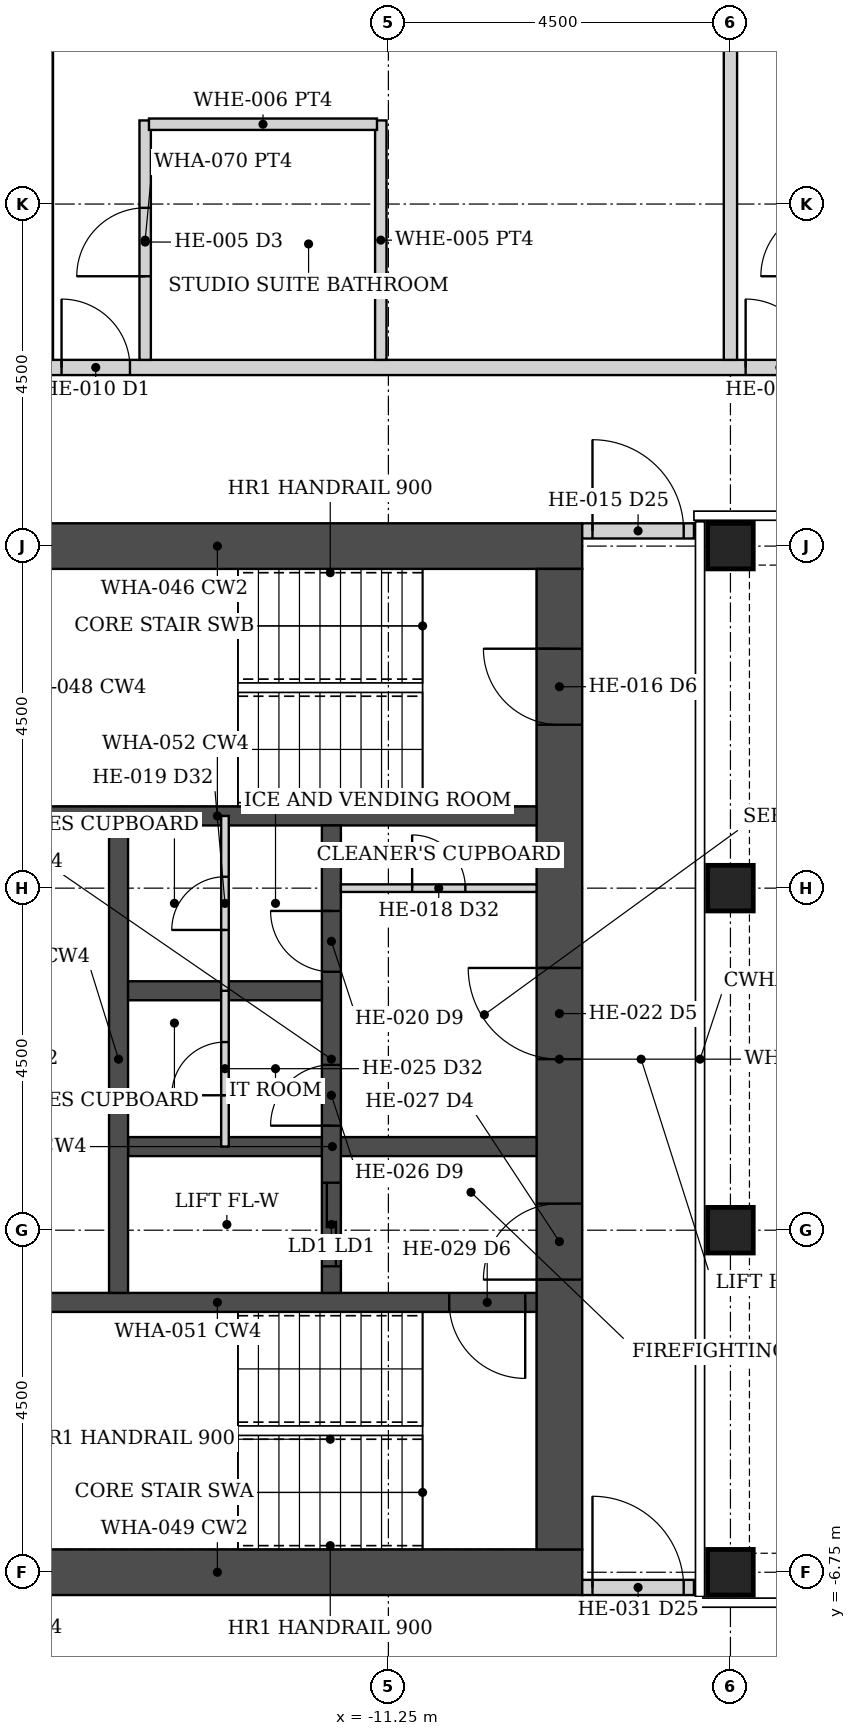
"""IFC4 building model, lengths in metres.
Left out: names, types, materials, properties, quantities, classifications, styles, units other than length and angle.
Written with IfcOpenShell. Run it as: python <this file> out.ifc"""

import sys

from ifc_helpers import new_model, si_unit, direction, frame, frame_2d, origin, origin_2d, place, context, subcontext, project, spatial, rectangle, hollow_rectangle, extrude, element, fill, save


model = new_model("IFC4")
c1 = context("Model", 3, precision=1e-05, world=origin(), true_north=direction((0.0, 1.0)))
c2 = subcontext(c1, "Body", "Model", "MODEL_VIEW")
j1 = project(units=[si_unit("LENGTHUNIT", "METRE"), si_unit("PLANEANGLEUNIT", "RADIAN")], contexts=[c1])
p1 = place(None, origin())
s1 = spatial("IfcSite", under=j1, at=p1, CompositionType="ELEMENT")
p2 = place(p1, origin())
s2 = spatial("IfcBuilding", under=s1, at=p2, CompositionType="ELEMENT")
p3 = place(p2, frame((0.0, 0.0, 161.6)))
s3 = spatial("IfcBuildingStorey", under=s2, at=p3, CompositionType="ELEMENT", Elevation=161.6)
for number, where, z_axis, x_axis in (
    (1, (-6.75, -6.75, 0.0), (0.0, 0.0, 1.0), (1.0, 0.0, 0.0)),
    (2, (-6.75, -2.25, 0.0), (0.0, 0.0, 1.0), (1.0, 0.0, 0.0)),
    (3, (-6.75, 2.25, 0.0), (0.0, 0.0, 1.0), (1.0, 0.0, 0.0)),
    (4, (-6.75, 6.75, 0.0), (0.0, 0.0, 1.0), (1.0, 0.0, 0.0)),
):
    element("IfcColumn", number, at=place(p3, frame(where, z_axis=z_axis, x_axis=x_axis)), inside=s3, PredefinedType="COLUMN", context=c2, shape_type="SweptSolid", body=[
        extrude(hollow_rectangle(XDim=0.6, YDim=0.6, WallThickness=0.03, at=origin_2d()), origin(), (0.0, 0.0, 1.0), 3.6),
    ])
for number, where, z_axis, x_axis in (
    (5, (-8.7, -6.75, 0.0), (0.0, 0.0, 1.0), (-1.0, 0.0, 0.0)),
    (6, (-8.7, 6.75, 0.0), (0.0, 0.0, 1.0), (-1.0, 0.0, 0.0)),
):
    element("IfcWall", number, at=place(p3, frame(where, z_axis=z_axis, x_axis=x_axis)), inside=s3, PredefinedType="SHEAR", context=c2, shape_type="SweptSolid", body=[
        extrude(rectangle(XDim=9.6, YDim=0.6, at=frame_2d((4.8, 0.0))), origin(), (0.0, 0.0, 1.0), 3.6),
    ])
p4 = place(p3, frame((-9.0, -6.45, 0.0), z_axis=(0.0, 0.0, 1.0), x_axis=(0.0, 1.0, 0.0)))
e7 = element("IfcWall", 7, at=p4, inside=s3, PredefinedType="SHEAR", context=c2, shape_type="SweptSolid", body=[
    extrude(rectangle(XDim=12.9, YDim=0.6, at=frame_2d((6.45, 0.0))), origin(), (0.0, 0.0, 1.0), 3.6),
])
p5 = place(p4, frame((3.55, 0.0, 0.0)))
e8 = element("IfcOpeningElement", 8, at=p5, cuts=e7, PredefinedType="OPENING", context=c2, shape_type="SweptSolid", body=[
    extrude(rectangle(XDim=1.0, YDim=2.1, at=frame_2d((0.5, 1.05))), frame((0.0, 0.31, 0.0), z_axis=(0.0, -1.0, 0.0), x_axis=(1.0, 0.0, 0.0)), (0.0, 0.0, 1.0), 0.62),
])
p6 = place(p4, frame((6.45, 0.0, 0.0)))
e9 = element("IfcOpeningElement", 9, at=p6, cuts=e7, PredefinedType="OPENING", context=c2, shape_type="SweptSolid", body=[
    extrude(rectangle(XDim=1.2, YDim=2.1, at=frame_2d((0.6, 1.05))), frame((0.0, 0.31, 0.0), z_axis=(0.0, -1.0, 0.0), x_axis=(1.0, 0.0, 0.0)), (0.0, 0.0, 1.0), 0.62),
])
p7 = place(p4, frame((10.85, 0.0, 0.0)))
e10 = element("IfcOpeningElement", 10, at=p7, cuts=e7, PredefinedType="OPENING", context=c2, shape_type="SweptSolid", body=[
    extrude(rectangle(XDim=1.0, YDim=2.1, at=frame_2d((0.5, 1.05))), frame((0.0, 0.31, 0.0), z_axis=(0.0, -1.0, 0.0), x_axis=(1.0, 0.0, 0.0)), (0.0, 0.0, 1.0), 0.62),
])
p8 = place(p3, frame((-9.3, -3.2, 0.0), z_axis=(0.0, 0.0, 1.0), x_axis=(-1.0, 0.0, 0.0)))
e11 = element("IfcWall", 11, at=p8, inside=s3, PredefinedType="SHEAR", context=c2, shape_type="SweptSolid", body=[
    extrude(rectangle(XDim=8.4, YDim=0.25, at=frame_2d((4.2, 0.0))), origin(), (0.0, 0.0, 1.0), 3.6),
])
p9 = place(p8, frame((0.15, 0.0, 0.0)))
e12 = element("IfcOpeningElement", 12, at=p9, cuts=e11, PredefinedType="OPENING", context=c2, shape_type="SweptSolid", body=[
    extrude(rectangle(XDim=1.0, YDim=2.1, at=frame_2d((0.5, 1.05))), frame((0.0, 0.135, 0.0), z_axis=(0.0, -1.0, 0.0), x_axis=(1.0, 0.0, 0.0)), (0.0, 0.0, 1.0), 0.27),
])
p10 = place(p3, frame((-9.3, 3.2, 0.0), z_axis=(0.0, 0.0, 1.0), x_axis=(-1.0, 0.0, 0.0)))
e13 = element("IfcWall", 13, at=p10, inside=s3, PredefinedType="SHEAR", context=c2, shape_type="SweptSolid", body=[
    extrude(rectangle(XDim=8.4, YDim=0.25, at=frame_2d((4.2, 0.0))), origin(), (0.0, 0.0, 1.0), 3.6),
])
p11 = place(p3, frame((-9.3, -1.15, 0.0), z_axis=(0.0, 0.0, 1.0), x_axis=(-1.0, 0.0, 0.0)))
e14 = element("IfcWall", 14, at=p11, inside=s3, PredefinedType="SHEAR", context=c2, shape_type="SweptSolid", body=[
    extrude(rectangle(XDim=5.375, YDim=0.25, at=frame_2d((2.688, 0.0))), origin(), (0.0, 0.0, 1.0), 3.6),
])
p12 = place(p3, frame((-12.0, -3.075, 0.0), z_axis=(0.0, 0.0, 1.0), x_axis=(0.0, 1.0, 0.0)))
e15 = element("IfcWall", 15, at=p12, inside=s3, PredefinedType="SHEAR", context=c2, shape_type="SweptSolid", body=[
    extrude(rectangle(XDim=6.15, YDim=0.25, at=frame_2d((3.075, 0.0))), origin(), (0.0, 0.0, 1.0), 3.6),
])
p13 = place(p12, frame((2.2, 0.0, 0.0)))
e16 = element("IfcOpeningElement", 16, at=p13, cuts=e15, PredefinedType="OPENING", context=c2, shape_type="SweptSolid", body=[
    extrude(rectangle(XDim=0.8, YDim=2.1, at=frame_2d((0.4, 1.05))), frame((0.0, 0.135, 0.0), z_axis=(0.0, -1.0, 0.0), x_axis=(1.0, 0.0, 0.0)), (0.0, 0.0, 1.0), 0.27),
])
p14 = place(p12, frame((4.225, 0.0, 0.0)))
e17 = element("IfcOpeningElement", 17, at=p14, cuts=e15, PredefinedType="OPENING", context=c2, shape_type="SweptSolid", body=[
    extrude(rectangle(XDim=0.8, YDim=2.1, at=frame_2d((0.4, 1.05))), frame((0.0, 0.135, 0.0), z_axis=(0.0, -1.0, 0.0), x_axis=(1.0, 0.0, 0.0)), (0.0, 0.0, 1.0), 0.27),
])
p15 = place(p12, frame((0.35, 0.0, 0.0)))
e18 = element("IfcOpeningElement", 18, at=p15, cuts=e15, PredefinedType="OPENING", context=c2, shape_type="SweptSolid", body=[
    extrude(rectangle(XDim=1.1, YDim=2.1, at=frame_2d((0.55, 1.05))), frame((0.0, 0.135, 0.0), z_axis=(0.0, -1.0, 0.0), x_axis=(1.0, 0.0, 0.0)), (0.0, 0.0, 1.0), 0.27),
])
p16 = place(p3, frame((-14.8, -3.075, 0.0), z_axis=(0.0, 0.0, 1.0), x_axis=(0.0, 1.0, 0.0)))
e19 = element("IfcWall", 19, at=p16, inside=s3, PredefinedType="SHEAR", context=c2, shape_type="SweptSolid", body=[
    extrude(rectangle(XDim=6.15, YDim=0.25, at=frame_2d((3.075, 0.0))), origin(), (0.0, 0.0, 1.0), 3.6),
])
p17 = place(p3, frame((-12.125, 0.9, 0.0), z_axis=(0.0, 0.0, 1.0), x_axis=(-1.0, 0.0, 0.0)))
e20 = element("IfcWall", 20, at=p17, inside=s3, PredefinedType="SHEAR", context=c2, shape_type="SweptSolid", body=[
    extrude(rectangle(XDim=2.55, YDim=0.25, at=frame_2d((1.275, 0.0))), origin(), (0.0, 0.0, 1.0), 3.6),
])
p18 = place(p3, frame((-8.7, 6.95, 0.0), z_axis=(0.0, 0.0, 1.0), x_axis=(1.0, 0.0, 0.0)))
e21 = element("IfcWall", 21, at=p18, inside=s3, PredefinedType="PARTITIONING", context=c2, shape_type="SweptSolid", body=[
    extrude(rectangle(XDim=1.47, YDim=0.2, at=frame_2d((0.735, 0.0))), origin(), (0.0, 0.0, 1.0), 2.473),
])
p19 = place(p18, frame((0.135, 0.0, 0.0)))
e22 = element("IfcOpeningElement", 22, at=p19, cuts=e21, PredefinedType="OPENING", context=c2, shape_type="SweptSolid", body=[
    extrude(rectangle(XDim=1.2, YDim=2.1, at=frame_2d((0.6, 1.05))), frame((0.0, 0.11, 0.0), z_axis=(0.0, -1.0, 0.0), x_axis=(1.0, 0.0, 0.0)), (0.0, 0.0, 1.0), 0.22),
])
p20 = place(p3, frame((-8.7, -6.95, 0.0), z_axis=(0.0, 0.0, 1.0), x_axis=(1.0, 0.0, 0.0)))
e23 = element("IfcWall", 23, at=p20, inside=s3, PredefinedType="PARTITIONING", context=c2, shape_type="SweptSolid", body=[
    extrude(rectangle(XDim=1.47, YDim=0.2, at=frame_2d((0.735, 0.0))), origin(), (0.0, 0.0, 1.0), 2.473),
])
p21 = place(p20, frame((0.135, 0.0, 0.0)))
e24 = element("IfcOpeningElement", 24, at=p21, cuts=e23, PredefinedType="OPENING", context=c2, shape_type="SweptSolid", body=[
    extrude(rectangle(XDim=1.2, YDim=2.1, at=frame_2d((0.6, 1.05))), frame((0.0, 0.11, 0.0), z_axis=(0.0, -1.0, 0.0), x_axis=(1.0, 0.0, 0.0)), (0.0, 0.0, 1.0), 0.22),
])
p22 = place(p3, frame((-22.3, 9.1, 0.0), z_axis=(0.0, 0.0, 1.0), x_axis=(1.0, 0.0, 0.0)))
e25 = element("IfcWall", 25, at=p22, inside=s3, PredefinedType="PARTITIONING", context=c2, shape_type="SweptSolid", body=[
    extrude(rectangle(XDim=44.6, YDim=0.2, at=frame_2d((22.3, 0.0))), origin(), (0.0, 0.0, 1.0), 2.473),
])
p23 = place(p22, frame((6.75, 0.0, 0.0)))
e26 = element("IfcOpeningElement", 26, at=p23, cuts=e25, PredefinedType="OPENING", context=c2, shape_type="SweptSolid", body=[
    extrude(rectangle(XDim=0.9, YDim=2.1, at=frame_2d((0.45, 1.05))), frame((0.0, 0.11, 0.0), z_axis=(0.0, -1.0, 0.0), x_axis=(1.0, 0.0, 0.0)), (0.0, 0.0, 1.0), 0.22),
])
p24 = place(p22, frame((15.75, 0.0, 0.0)))
e27 = element("IfcOpeningElement", 27, at=p24, cuts=e25, PredefinedType="OPENING", context=c2, shape_type="SweptSolid", body=[
    extrude(rectangle(XDim=0.9, YDim=2.1, at=frame_2d((0.45, 1.05))), frame((0.0, 0.11, 0.0), z_axis=(0.0, -1.0, 0.0), x_axis=(1.0, 0.0, 0.0)), (0.0, 0.0, 1.0), 0.22),
])
p25 = place(p22, frame((20.25, 0.0, 0.0)))
e28 = element("IfcOpeningElement", 28, at=p25, cuts=e25, PredefinedType="OPENING", context=c2, shape_type="SweptSolid", body=[
    extrude(rectangle(XDim=0.9, YDim=2.1, at=frame_2d((0.45, 1.05))), frame((0.0, 0.11, 0.0), z_axis=(0.0, -1.0, 0.0), x_axis=(1.0, 0.0, 0.0)), (0.0, 0.0, 1.0), 0.22),
])
p26 = place(p22, frame((36.95, 0.0, 0.0)))
e29 = element("IfcOpeningElement", 29, at=p26, cuts=e25, PredefinedType="OPENING", context=c2, shape_type="SweptSolid", body=[
    extrude(rectangle(XDim=0.9, YDim=2.1, at=frame_2d((0.45, 1.05))), frame((0.0, 0.11, 0.0), z_axis=(0.0, -1.0, 0.0), x_axis=(1.0, 0.0, 0.0)), (0.0, 0.0, 1.0), 0.22),
])
p27 = place(p22, frame((38.85, 0.0, 0.0)))
e30 = element("IfcOpeningElement", 30, at=p27, cuts=e25, PredefinedType="OPENING", context=c2, shape_type="SweptSolid", body=[
    extrude(rectangle(XDim=0.9, YDim=2.1, at=frame_2d((0.45, 1.05))), frame((0.0, 0.11, 0.0), z_axis=(0.0, -1.0, 0.0), x_axis=(1.0, 0.0, 0.0)), (0.0, 0.0, 1.0), 0.22),
])
p28 = place(p22, frame((4.85, 0.0, 0.0)))
e31 = element("IfcOpeningElement", 31, at=p28, cuts=e25, PredefinedType="OPENING", context=c2, shape_type="SweptSolid", body=[
    extrude(rectangle(XDim=0.9, YDim=2.1, at=frame_2d((0.45, 1.05))), frame((0.0, 0.11, 0.0), z_axis=(0.0, -1.0, 0.0), x_axis=(1.0, 0.0, 0.0)), (0.0, 0.0, 1.0), 0.22),
])
p29 = place(p3, frame((-14.45, 9.2, 0.0), z_axis=(0.0, 0.0, 1.0), x_axis=(0.0, 1.0, 0.0)))
e32 = element("IfcWall", 32, at=p29, inside=s3, PredefinedType="PARTITIONING", context=c2, shape_type="SweptSolid", body=[
    extrude(rectangle(XDim=3.15, YDim=0.15, at=frame_2d((1.575, 0.0))), origin(), (0.0, 0.0, 1.0), 2.473),
])
p30 = place(p29, frame((1.1, 0.0, 0.0)))
e33 = element("IfcOpeningElement", 33, at=p30, cuts=e32, PredefinedType="OPENING", context=c2, shape_type="SweptSolid", body=[
    extrude(rectangle(XDim=0.9, YDim=2.1, at=frame_2d((0.45, 1.05))), frame((0.0, 0.085, 0.0), z_axis=(0.0, -1.0, 0.0), x_axis=(1.0, 0.0, 0.0)), (0.0, 0.0, 1.0), 0.17),
])
p31 = place(p3, frame((-11.35, 9.2, 0.0), z_axis=(0.0, 0.0, 1.0), x_axis=(0.0, 1.0, 0.0)))
e34 = element("IfcWall", 34, at=p31, inside=s3, PredefinedType="PARTITIONING", context=c2, shape_type="SweptSolid", body=[
    extrude(rectangle(XDim=3.15, YDim=0.15, at=frame_2d((1.575, 0.0))), origin(), (0.0, 0.0, 1.0), 2.473),
])
p32 = place(p3, frame((-14.4, 12.3, 0.0), z_axis=(0.0, 0.0, 1.0), x_axis=(1.0, 0.0, 0.0)))
e35 = element("IfcWall", 35, at=p32, inside=s3, PredefinedType="PARTITIONING", context=c2, shape_type="SweptSolid", body=[
    extrude(rectangle(XDim=3.0, YDim=0.15, at=frame_2d((1.5, 0.0))), origin(), (0.0, 0.0, 1.0), 2.473),
])
for number, where, z_axis, x_axis in (
    (36, (-15.75, 9.2, 0.0), (0.0, 0.0, 1.0), (0.0, 1.0, 0.0)),
    (37, (-6.75, 9.2, 0.0), (0.0, 0.0, 1.0), (0.0, 1.0, 0.0)),
):
    element("IfcWall", number, at=place(p3, frame(where, z_axis=z_axis, x_axis=x_axis)), inside=s3, PredefinedType="PARTITIONING", context=c2, shape_type="SweptSolid", body=[
        extrude(rectangle(XDim=12.9, YDim=0.175, at=frame_2d((6.45, 0.0))), origin(), (0.0, 0.0, 1.0), 2.473),
    ])
p33 = place(p3, frame((-11.875, 2.25, 0.0), z_axis=(0.0, 0.0, 1.0), x_axis=(1.0, 0.0, 0.0)))
e38 = element("IfcWall", 38, at=p33, inside=s3, PredefinedType="PARTITIONING", context=c2, shape_type="SweptSolid", body=[
    extrude(rectangle(XDim=2.575, YDim=0.1, at=frame_2d((1.288, 0.0))), origin(), (0.0, 0.0, 1.0), 2.473),
])
p34 = place(p33, frame((0.938, 0.0, 0.0)))
e39 = element("IfcOpeningElement", 39, at=p34, cuts=e38, PredefinedType="OPENING", context=c2, shape_type="SweptSolid", body=[
    extrude(rectangle(XDim=0.7, YDim=2.1, at=frame_2d((0.35, 1.05))), frame((0.0, 0.06, 0.0), z_axis=(0.0, -1.0, 0.0), x_axis=(1.0, 0.0, 0.0)), (0.0, 0.0, 1.0), 0.12),
])
p35 = place(p3, frame((-13.4, -1.15, 0.0), z_axis=(0.0, 0.0, 1.0), x_axis=(0.0, 1.0, 0.0)))
e40 = element("IfcWall", 40, at=p35, inside=s3, PredefinedType="PARTITIONING", context=c2, shape_type="SweptSolid", body=[
    extrude(rectangle(XDim=2.05, YDim=0.1, at=frame_2d((1.025, 0.0))), origin(), (0.0, 0.0, 1.0), 2.473),
])
p36 = place(p35, frame((0.675, 0.0, 0.0)))
e41 = element("IfcOpeningElement", 41, at=p36, cuts=e40, PredefinedType="OPENING", context=c2, shape_type="SweptSolid", body=[
    extrude(rectangle(XDim=0.7, YDim=2.1, at=frame_2d((0.35, 1.05))), frame((0.0, 0.06, 0.0), z_axis=(0.0, -1.0, 0.0), x_axis=(1.0, 0.0, 0.0)), (0.0, 0.0, 1.0), 0.12),
])
p37 = place(p3, frame((-13.4, 0.9, 0.0), z_axis=(0.0, 0.0, 1.0), x_axis=(0.0, 1.0, 0.0)))
e42 = element("IfcWall", 42, at=p37, inside=s3, PredefinedType="PARTITIONING", context=c2, shape_type="SweptSolid", body=[
    extrude(rectangle(XDim=2.3, YDim=0.1, at=frame_2d((1.15, 0.0))), origin(), (0.0, 0.0, 1.0), 2.473),
])
p38 = place(p37, frame((0.8, 0.0, 0.0)))
e43 = element("IfcOpeningElement", 43, at=p38, cuts=e42, PredefinedType="OPENING", context=c2, shape_type="SweptSolid", body=[
    extrude(rectangle(XDim=0.7, YDim=2.1, at=frame_2d((0.35, 1.05))), frame((0.0, 0.06, 0.0), z_axis=(0.0, -1.0, 0.0), x_axis=(1.0, 0.0, 0.0)), (0.0, 0.0, 1.0), 0.12),
])
p39 = place(p19, origin())
e44 = element("IfcDoor", 44, at=p39, inside=s3, OperationType="DOUBLE_DOOR_DOUBLE_SWING", PredefinedType="DOOR", context=c2, shape_type="SweptSolid", body=[
    extrude(rectangle(XDim=1.2, YDim=2.1, at=frame_2d((0.6, 1.05))), frame((0.0, 0.025, 0.0), z_axis=(0.0, -1.0, 0.0), x_axis=(1.0, 0.0, 0.0)), (0.0, 0.0, 1.0), 0.05),
])
fill(e22, e44)
p40 = place(p21, origin())
e45 = element("IfcDoor", 45, at=p40, inside=s3, OperationType="DOUBLE_DOOR_DOUBLE_SWING", PredefinedType="DOOR", context=c2, shape_type="SweptSolid", body=[
    extrude(rectangle(XDim=1.2, YDim=2.1, at=frame_2d((0.6, 1.05))), frame((0.0, 0.025, 0.0), z_axis=(0.0, -1.0, 0.0), x_axis=(1.0, 0.0, 0.0)), (0.0, 0.0, 1.0), 0.05),
])
fill(e24, e45)
p41 = place(p23, origin())
e46 = element("IfcDoor", 46, at=p41, inside=s3, OperationType="SINGLE_SWING_LEFT", PredefinedType="DOOR", context=c2, shape_type="SweptSolid", body=[
    extrude(rectangle(XDim=0.9, YDim=2.1, at=frame_2d((0.45, 1.05))), frame((0.0, 0.025, 0.0), z_axis=(0.0, -1.0, 0.0), x_axis=(1.0, 0.0, 0.0)), (0.0, 0.0, 1.0), 0.05),
])
fill(e26, e46)
p42 = place(p30, origin())
e47 = element("IfcDoor", 47, at=p42, inside=s3, OperationType="SINGLE_SWING_LEFT", PredefinedType="DOOR", context=c2, shape_type="SweptSolid", body=[
    extrude(rectangle(XDim=0.9, YDim=2.1, at=frame_2d((0.45, 1.05))), frame((0.0, 0.025, 0.0), z_axis=(0.0, -1.0, 0.0), x_axis=(1.0, 0.0, 0.0)), (0.0, 0.0, 1.0), 0.05),
])
fill(e33, e47)
p43 = place(p24, origin())
e48 = element("IfcDoor", 48, at=p43, inside=s3, OperationType="SINGLE_SWING_LEFT", PredefinedType="DOOR", context=c2, shape_type="SweptSolid", body=[
    extrude(rectangle(XDim=0.9, YDim=2.1, at=frame_2d((0.45, 1.05))), frame((0.0, 0.025, 0.0), z_axis=(0.0, -1.0, 0.0), x_axis=(1.0, 0.0, 0.0)), (0.0, 0.0, 1.0), 0.05),
])
fill(e27, e48)
p44 = place(p5, origin())
e49 = element("IfcDoor", 49, at=p44, inside=s3, OperationType="SINGLE_SWING_LEFT", PredefinedType="DOOR", context=c2, shape_type="SweptSolid", body=[
    extrude(rectangle(XDim=1.0, YDim=2.1, at=frame_2d((0.5, 1.05))), frame((0.0, 0.025, 0.0), z_axis=(0.0, -1.0, 0.0), x_axis=(1.0, 0.0, 0.0)), (0.0, 0.0, 1.0), 0.05),
])
fill(e8, e49)
p45 = place(p9, origin())
e50 = element("IfcDoor", 50, at=p45, inside=s3, OperationType="SINGLE_SWING_LEFT", PredefinedType="DOOR", context=c2, shape_type="SweptSolid", body=[
    extrude(rectangle(XDim=1.0, YDim=2.1, at=frame_2d((0.5, 1.05))), frame((0.0, 0.025, 0.0), z_axis=(0.0, -1.0, 0.0), x_axis=(1.0, 0.0, 0.0)), (0.0, 0.0, 1.0), 0.05),
])
fill(e12, e50)
p46 = place(p34, origin())
e51 = element("IfcDoor", 51, at=p46, inside=s3, OperationType="SINGLE_SWING_LEFT", PredefinedType="DOOR", context=c2, shape_type="SweptSolid", body=[
    extrude(rectangle(XDim=0.7, YDim=2.1, at=frame_2d((0.35, 1.05))), frame((0.0, 0.025, 0.0), z_axis=(0.0, -1.0, 0.0), x_axis=(1.0, 0.0, 0.0)), (0.0, 0.0, 1.0), 0.05),
])
fill(e39, e51)
p47 = place(p6, origin())
e52 = element("IfcDoor", 52, at=p47, inside=s3, OperationType="SINGLE_SWING_RIGHT", PredefinedType="DOOR", context=c2, shape_type="SweptSolid", body=[
    extrude(rectangle(XDim=1.2, YDim=2.1, at=frame_2d((0.6, 1.05))), frame((0.0, 0.025, 0.0), z_axis=(0.0, -1.0, 0.0), x_axis=(1.0, 0.0, 0.0)), (0.0, 0.0, 1.0), 0.05),
])
fill(e9, e52)
p48 = place(p36, origin())
e53 = element("IfcDoor", 53, at=p48, inside=s3, OperationType="SINGLE_SWING_LEFT", PredefinedType="DOOR", context=c2, shape_type="SweptSolid", body=[
    extrude(rectangle(XDim=0.7, YDim=2.1, at=frame_2d((0.35, 1.05))), frame((0.0, 0.025, 0.0), z_axis=(0.0, -1.0, 0.0), x_axis=(1.0, 0.0, 0.0)), (0.0, 0.0, 1.0), 0.05),
])
fill(e41, e53)
p49 = place(p13, origin())
e54 = element("IfcDoor", 54, at=p49, inside=s3, OperationType="SINGLE_SWING_LEFT", PredefinedType="DOOR", context=c2, shape_type="SweptSolid", body=[
    extrude(rectangle(XDim=0.8, YDim=2.1, at=frame_2d((0.4, 1.05))), frame((0.0, 0.025, 0.0), z_axis=(0.0, -1.0, 0.0), x_axis=(1.0, 0.0, 0.0)), (0.0, 0.0, 1.0), 0.05),
])
fill(e16, e54)
p50 = place(p38, origin())
e55 = element("IfcDoor", 55, at=p50, inside=s3, OperationType="SINGLE_SWING_LEFT", PredefinedType="DOOR", context=c2, shape_type="SweptSolid", body=[
    extrude(rectangle(XDim=0.7, YDim=2.1, at=frame_2d((0.35, 1.05))), frame((0.0, 0.025, 0.0), z_axis=(0.0, -1.0, 0.0), x_axis=(1.0, 0.0, 0.0)), (0.0, 0.0, 1.0), 0.05),
])
fill(e43, e55)
p51 = place(p14, origin())
e56 = element("IfcDoor", 56, at=p51, inside=s3, OperationType="SINGLE_SWING_RIGHT", PredefinedType="DOOR", context=c2, shape_type="SweptSolid", body=[
    extrude(rectangle(XDim=0.8, YDim=2.1, at=frame_2d((0.4, 1.05))), frame((0.0, 0.025, 0.0), z_axis=(0.0, -1.0, 0.0), x_axis=(1.0, 0.0, 0.0)), (0.0, 0.0, 1.0), 0.05),
])
fill(e17, e56)
p52 = place(p7, origin())
e57 = element("IfcDoor", 57, at=p52, inside=s3, OperationType="SINGLE_SWING_RIGHT", PredefinedType="DOOR", context=c2, shape_type="SweptSolid", body=[
    extrude(rectangle(XDim=1.0, YDim=2.1, at=frame_2d((0.5, 1.05))), frame((0.0, 0.025, 0.0), z_axis=(0.0, -1.0, 0.0), x_axis=(1.0, 0.0, 0.0)), (0.0, 0.0, 1.0), 0.05),
])
fill(e10, e57)
p53 = place(p15, origin())
e58 = element("IfcDoor", 58, at=p53, inside=s3, OperationType="DOUBLE_DOOR_SLIDING", PredefinedType="DOOR", context=c2, shape_type="SweptSolid", body=[
    extrude(rectangle(XDim=1.1, YDim=2.1, at=frame_2d((0.55, 1.05))), frame((0.0, 0.025, 0.0), z_axis=(0.0, -1.0, 0.0), x_axis=(1.0, 0.0, 0.0)), (0.0, 0.0, 1.0), 0.05),
])
fill(e18, e58)
save(model, sys.argv[1])
